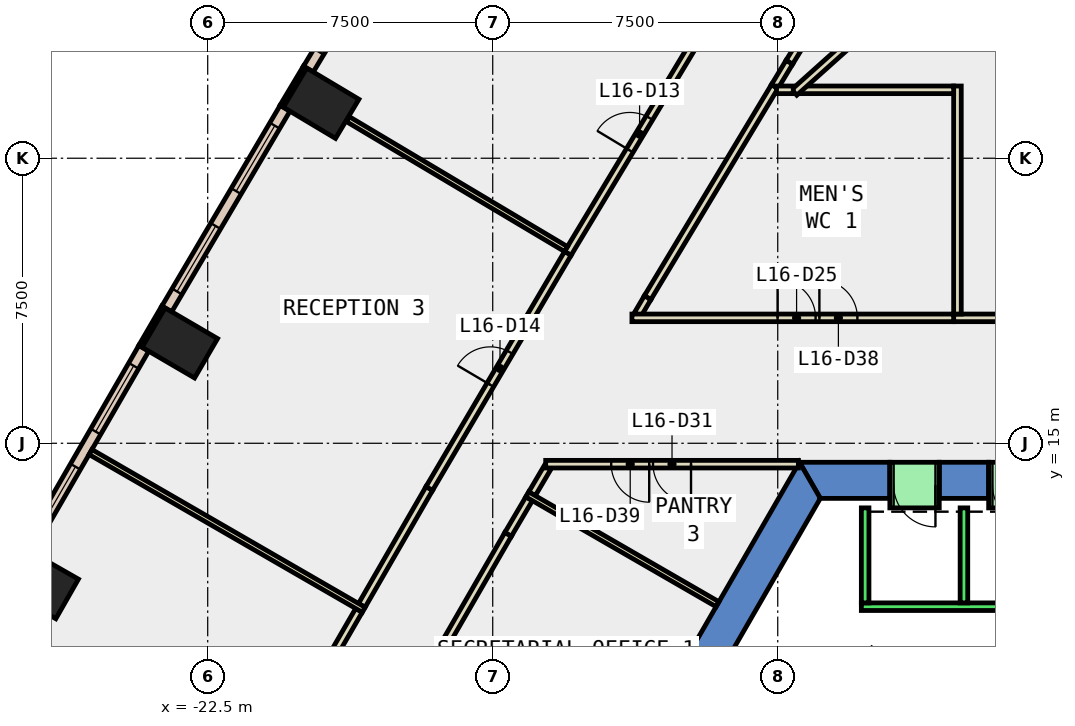
"""IFC4 building model, lengths in metres.
Left out: names, types, materials, properties, quantities, classifications, styles, units other than length and angle.
Written with IfcOpenShell. Run it as: python <this file> out.ifc"""

import sys

from ifc_helpers import new_model, si_unit, direction, frame, frame_2d, origin, origin_2d, place, context, subcontext, project, spatial, polyline, rectangle, outline, extrude, element, fill, save


model = new_model("IFC4")
c1 = context("Model", 3, precision=1e-05, world=origin(), true_north=direction((0.0, 1.0)))
c2 = subcontext(c1, "Body", "Model", "MODEL_VIEW")
j1 = project(units=[si_unit("LENGTHUNIT", "METRE"), si_unit("PLANEANGLEUNIT", "RADIAN")], contexts=[c1])
p1 = place(None, origin())
s1 = spatial("IfcSite", under=j1, at=p1, CompositionType="ELEMENT")
p2 = place(p1, origin())
s2 = spatial("IfcBuilding", under=s1, at=p2, CompositionType="ELEMENT")
p3 = place(p2, frame((0.0, 0.0, 77.0)))
s3 = spatial("IfcBuildingStorey", under=s2, at=p3, CompositionType="ELEMENT", Elevation=77.0)
for number, where, z_axis, x_axis in (
    (1, (-19.516, 23.947, -0.4), (0.0, 0.0, 1.0), (0.513, 0.858, 0.0)),
    (2, (-23.234, 17.64, -0.4), (0.0, 0.0, 1.0), (0.504, 0.864, 0.0)),
    (3, (-26.894, 11.301, -0.4), (0.0, 0.0, 1.0), (0.496, 0.869, 0.0)),
):
    element("IfcColumn", number, at=place(p3, frame(where, z_axis=z_axis, x_axis=x_axis)), inside=s3, PredefinedType="COLUMN", context=c2, shape_type="SweptSolid", body=[
        extrude(rectangle(XDim=1.2, YDim=1.6, at=origin_2d()), origin(), (0.0, 0.0, 1.0), 4.0),
    ])
p4 = place(p3, frame((0.0, 0.0, -0.4)))
e4 = element("IfcWall", 4, at=p4, inside=s3, PredefinedType="SHEAR", context=c2, shape_type="SweptSolid", body=[
    extrude(outline(polyline([(-3.25, 14.5), (-3.25, 13.55), (-1.95, 13.55), (-1.95, 14.5), (-3.25, 14.5)])), origin(), (0.0, 0.0, 1.0), 4.0),
])
p5 = place(p3, frame((0.0, 0.0, -0.4)))
e5 = element("IfcWall", 5, at=p5, inside=s3, PredefinedType="SHEAR", context=c2, shape_type="SweptSolid", body=[
    extrude(outline(polyline([(-4.55, 13.55), (-4.55, 14.5), (-6.928, 14.5), (-6.38, 13.55), (-4.55, 13.55)])), origin(), (0.0, 0.0, 1.0), 4.0),
])
p6 = place(p3, frame((0.0, 0.0, -0.4)))
e6 = element("IfcWall", 6, at=p6, inside=s3, PredefinedType="SHEAR", context=c2, shape_type="SweptSolid", body=[
    extrude(outline(polyline([(-12.267, 5.252), (-11.444, 4.777), (-6.38, 13.55), (-6.928, 14.5), (-12.267, 5.252)])), origin(), (0.0, 0.0, 1.0), 4.0),
])
p7 = place(p3, frame((-19.938, 24.898, 0.0), z_axis=(0.0, 0.0, 1.0), x_axis=(-0.513238760752, -0.858245870635, 0.0)))
e7 = element("IfcWall", 7, at=p7, inside=s3, PredefinedType="STANDARD", context=c2, shape_type="SweptSolid", body=[
    extrude(rectangle(XDim=1.2, YDim=0.1, at=frame_2d((0.6, 0.0))), origin(), (0.0, 0.0, 1.0), 3.6),
])
p8 = place(p3, frame((-23.665, 18.587, 0.0), z_axis=(0.0, 0.0, 1.0), x_axis=(-0.504313844903, -0.863520437418, 0.0)))
e8 = element("IfcWall", 8, at=p8, inside=s3, PredefinedType="STANDARD", context=c2, shape_type="SweptSolid", body=[
    extrude(rectangle(XDim=1.2, YDim=0.1, at=frame_2d((0.6, 0.0))), origin(), (0.0, 0.0, 1.0), 3.6),
])
p9 = place(p3, frame((-16.69, 30.097, 0.0), z_axis=(0.0, 0.0, 1.0), x_axis=(-0.515690089348, -0.856775193238, 0.0)))
e9 = element("IfcWall", 9, at=p9, inside=s3, PredefinedType="STANDARD", context=c2, shape_type="SweptSolid", body=[
    extrude(rectangle(XDim=6.13, YDim=0.3, at=frame_2d((3.065, 0.0))), origin(), (0.0, 0.0, 1.0), 3.6),
])
p10 = place(p9, frame((0.532, 0.0, 0.9)))
e10 = element("IfcOpeningElement", 10, at=p10, cuts=e9, PredefinedType="OPENING", context=c2, shape_type="SweptSolid", body=[
    extrude(rectangle(XDim=2.0, YDim=2.6, at=frame_2d((1.0, 1.3))), frame((0.0, 0.16, 0.0), z_axis=(0.0, -1.0, 0.0), x_axis=(1.0, 0.0, 0.0)), (0.0, 0.0, 1.0), 0.32),
])
p11 = place(p9, frame((3.597, 0.0, 0.9)))
e11 = element("IfcOpeningElement", 11, at=p11, cuts=e9, PredefinedType="OPENING", context=c2, shape_type="SweptSolid", body=[
    extrude(rectangle(XDim=2.0, YDim=2.6, at=frame_2d((1.0, 1.3))), frame((0.0, 0.16, 0.0), z_axis=(0.0, -1.0, 0.0), x_axis=(1.0, 0.0, 0.0)), (0.0, 0.0, 1.0), 0.32),
])
p12 = place(p3, frame((-20.464, 23.816, 0.0), z_axis=(0.0, 0.0, 1.0), x_axis=(-0.507716058644, -0.861524465001, 0.0)))
e12 = element("IfcWall", 12, at=p12, inside=s3, PredefinedType="STANDARD", context=c2, shape_type="SweptSolid", body=[
    extrude(rectangle(XDim=6.131, YDim=0.3, at=frame_2d((3.065, 0.0))), origin(), (0.0, 0.0, 1.0), 3.6),
])
p13 = place(p12, frame((0.533, 0.0, 0.9)))
e13 = element("IfcOpeningElement", 13, at=p13, cuts=e12, PredefinedType="OPENING", context=c2, shape_type="SweptSolid", body=[
    extrude(rectangle(XDim=2.0, YDim=2.6, at=frame_2d((1.0, 1.3))), frame((0.0, 0.16, 0.0), z_axis=(0.0, -1.0, 0.0), x_axis=(1.0, 0.0, 0.0)), (0.0, 0.0, 1.0), 0.32),
])
p14 = place(p12, frame((3.598, 0.0, 0.9)))
e14 = element("IfcOpeningElement", 14, at=p14, cuts=e12, PredefinedType="OPENING", context=c2, shape_type="SweptSolid", body=[
    extrude(rectangle(XDim=2.0, YDim=2.6, at=frame_2d((1.0, 1.3))), frame((0.0, 0.16, 0.0), z_axis=(0.0, -1.0, 0.0), x_axis=(1.0, 0.0, 0.0)), (0.0, 0.0, 1.0), 0.32),
])
p15 = place(p3, frame((-24.181, 17.5, 0.0), z_axis=(0.0, 0.0, 1.0), x_axis=(-0.499998239139, -0.866026420416, 0.0)))
e15 = element("IfcWall", 15, at=p15, inside=s3, PredefinedType="STANDARD", context=c2, shape_type="SweptSolid", body=[
    extrude(rectangle(XDim=6.13, YDim=0.3, at=frame_2d((3.065, 0.0))), origin(), (0.0, 0.0, 1.0), 3.6),
])
p16 = place(p15, frame((0.533, 0.0, 0.9)))
e16 = element("IfcOpeningElement", 16, at=p16, cuts=e15, PredefinedType="OPENING", context=c2, shape_type="SweptSolid", body=[
    extrude(rectangle(XDim=2.0, YDim=2.6, at=frame_2d((1.0, 1.3))), frame((0.0, 0.16, 0.0), z_axis=(0.0, -1.0, 0.0), x_axis=(1.0, 0.0, 0.0)), (0.0, 0.0, 1.0), 0.32),
])
p17 = place(p15, frame((3.598, 0.0, 0.9)))
e17 = element("IfcOpeningElement", 17, at=p17, cuts=e15, PredefinedType="OPENING", context=c2, shape_type="SweptSolid", body=[
    extrude(rectangle(XDim=2.0, YDim=2.6, at=frame_2d((1.0, 1.3))), frame((0.0, 0.16, 0.0), z_axis=(0.0, -1.0, 0.0), x_axis=(1.0, 0.0, 0.0)), (0.0, 0.0, 1.0), 0.32),
])
p18 = place(p3, frame((-14.042, 13.541, 0.0), z_axis=(0.0, 0.0, 1.0), x_axis=(-0.507733830316, -0.861513991501, 0.0)))
e18 = element("IfcWall", 18, at=p18, inside=s3, PredefinedType="PARTITIONING", context=c2, shape_type="SweptSolid", body=[
    extrude(rectangle(XDim=1.091, YDim=0.2, at=frame_2d((0.545, 0.0))), origin(), (0.0, 0.0, 1.0), 3.6),
])
p19 = place(p3, frame((-14.596, 12.601, 0.0), z_axis=(0.0, 0.0, 1.0), x_axis=(-0.500017431331, -0.866015339567, 0.0)))
e19 = element("IfcWall", 19, at=p19, inside=s3, PredefinedType="PARTITIONING", context=c2, shape_type="SweptSolid", body=[
    extrude(rectangle(XDim=4.8, YDim=0.2, at=frame_2d((2.4, 0.0))), origin(), (0.0, 0.0, 1.0), 3.6),
])
p20 = place(p3, frame((-13.557, 14.364, 0.0), z_axis=(0.0, 0.0, 1.0), x_axis=(-0.507840899418, -0.861450881292, 0.0)))
e20 = element("IfcWall", 20, at=p20, inside=s3, PredefinedType="PARTITIONING", context=c2, shape_type="SweptSolid", body=[
    extrude(rectangle(XDim=0.806, YDim=0.2, at=frame_2d((0.403, 0.0))), origin(), (0.0, 0.0, 1.0), 3.6),
])
p21 = place(p3, frame((-7.58, 24.386, 0.0), z_axis=(0.0, 0.0, 1.0), x_axis=(-0.51574664882, -0.85674114774, 0.0)))
e21 = element("IfcWall", 21, at=p21, inside=s3, PredefinedType="PARTITIONING", context=c2, shape_type="SweptSolid", body=[
    extrude(rectangle(XDim=6.484, YDim=0.2, at=frame_2d((3.242, 0.0))), origin(), (0.0, 0.0, 1.0), 3.6),
])
p22 = place(p3, frame((-10.924, 18.831, 0.0), z_axis=(0.0, 0.0, 1.0), x_axis=(-0.507247363226, -0.861800506208, 0.0)))
e22 = element("IfcWall", 22, at=p22, inside=s3, PredefinedType="PARTITIONING", context=c2, shape_type="SweptSolid", body=[
    extrude(rectangle(XDim=0.516, YDim=0.2, at=frame_2d((0.258, 0.0))), origin(), (0.0, 0.0, 1.0), 3.6),
])
p23 = place(p3, frame((-3.411, 31.185, 0.0), z_axis=(0.0, 0.0, 1.0), x_axis=(-0.523464329994, -0.852047589765, 0.0)))
e23 = element("IfcWall", 23, at=p23, inside=s3, PredefinedType="PARTITIONING", context=c2, shape_type="SweptSolid", body=[
    extrude(rectangle(XDim=7.231, YDim=0.2, at=frame_2d((3.615, 0.0))), origin(), (0.0, 0.0, 1.0), 3.6),
])
p24 = place(p23, frame((3.115, 0.0, 0.0)))
e24 = element("IfcOpeningElement", 24, at=p24, cuts=e23, PredefinedType="OPENING", context=c2, shape_type="SweptSolid", body=[
    extrude(rectangle(XDim=1.0, YDim=2.1, at=frame_2d((0.5, 1.05))), frame((0.0, 0.11, 0.0), z_axis=(0.0, -1.0, 0.0), x_axis=(1.0, 0.0, 0.0)), (0.0, 0.0, 1.0), 0.22),
])
p25 = place(p3, frame((-7.196, 25.024, 0.0), z_axis=(0.0, 0.0, 1.0), x_axis=(-0.515748848873, -0.856739823334, 0.0)))
e25 = element("IfcWall", 25, at=p25, inside=s3, PredefinedType="PARTITIONING", context=c2, shape_type="SweptSolid", body=[
    extrude(rectangle(XDim=0.745, YDim=0.2, at=frame_2d((0.372, 0.0))), origin(), (0.0, 0.0, 1.0), 3.6),
])
p26 = place(p3, frame((-13.025, 19.995, 0.0), z_axis=(0.0, 0.0, 1.0), x_axis=(0.515828195336, 0.856692052546, 0.0)))
e26 = element("IfcWall", 26, at=p26, inside=s3, PredefinedType="PARTITIONING", context=c2, shape_type="SweptSolid", body=[
    extrude(rectangle(XDim=7.326, YDim=0.2, at=frame_2d((3.663, 0.0))), origin(), (0.0, 0.0, 1.0), 3.6),
])
p27 = place(p26, frame((3.163, 0.0, 0.0)))
e27 = element("IfcOpeningElement", 27, at=p27, cuts=e26, PredefinedType="OPENING", context=c2, shape_type="SweptSolid", body=[
    extrude(rectangle(XDim=1.0, YDim=2.1, at=frame_2d((0.5, 1.05))), frame((0.0, 0.11, 0.0), z_axis=(0.0, -1.0, 0.0), x_axis=(1.0, 0.0, 0.0)), (0.0, 0.0, 1.0), 0.22),
])
p28 = place(p3, frame((-18.445, 10.734, 0.0), z_axis=(0.0, 0.0, 1.0), x_axis=(0.499900903336, 0.866082609711, 0.0)))
e28 = element("IfcWall", 28, at=p28, inside=s3, PredefinedType="PARTITIONING", context=c2, shape_type="SweptSolid", body=[
    extrude(rectangle(XDim=3.553, YDim=0.2, at=frame_2d((1.776, 0.0))), origin(), (0.0, 0.0, 1.0), 3.6),
])
p29 = place(p3, frame((-16.669, 13.811, 0.0), z_axis=(0.0, 0.0, 1.0), x_axis=(0.507777955495, 0.861487984776, 0.0)))
e29 = element("IfcWall", 29, at=p29, inside=s3, PredefinedType="PARTITIONING", context=c2, shape_type="SweptSolid", body=[
    extrude(rectangle(XDim=7.178, YDim=0.2, at=frame_2d((3.589, 0.0))), origin(), (0.0, 0.0, 1.0), 3.6),
])
p30 = place(p29, frame((3.164, 0.0, 0.0)))
e30 = element("IfcOpeningElement", 30, at=p30, cuts=e29, PredefinedType="OPENING", context=c2, shape_type="SweptSolid", body=[
    extrude(rectangle(XDim=1.0, YDim=2.1, at=frame_2d((0.5, 1.05))), frame((0.0, 0.11, 0.0), z_axis=(0.0, -1.0, 0.0), x_axis=(1.0, 0.0, 0.0)), (0.0, 0.0, 1.0), 0.22),
])
p31 = place(p3, frame((-20.296, 7.53, 0.0), z_axis=(0.0, 0.0, 1.0), x_axis=(0.500236350306, 0.865888903863, 0.0)))
e31 = element("IfcWall", 31, at=p31, inside=s3, PredefinedType="PARTITIONING", context=c2, shape_type="SweptSolid", body=[
    extrude(rectangle(XDim=3.55, YDim=0.2, at=frame_2d((1.775, 0.0))), origin(), (0.0, 0.0, 1.0), 3.6),
])
p32 = place(p3, frame((-14.091, 13.655, 0.0), z_axis=(0.0, 0.0, 1.0), x_axis=(0.866035778077, -0.499982030767, 0.0)))
e32 = element("IfcWall", 32, at=p32, inside=s3, PredefinedType="PARTITIONING", context=c2, shape_type="SweptSolid", body=[
    extrude(rectangle(XDim=5.781, YDim=0.15, at=frame_2d((2.89, 0.0))), origin(), (0.0, 0.0, 1.0), 3.6),
])
p33 = place(p3, frame((-6.957, 14.45, 0.0), z_axis=(0.0, 0.0, 1.0), x_axis=(-1.0, 0.0, 0.0)))
e33 = element("IfcWall", 33, at=p33, inside=s3, PredefinedType="PARTITIONING", context=c2, shape_type="SweptSolid", body=[
    extrude(rectangle(XDim=6.649, YDim=0.2, at=frame_2d((3.324, 0.0))), origin(), (0.0, 0.0, 1.0), 3.6),
])
p34 = place(p33, frame((2.825, 0.0, 0.0)))
e34 = element("IfcOpeningElement", 34, at=p34, cuts=e33, PredefinedType="OPENING", context=c2, shape_type="SweptSolid", body=[
    extrude(rectangle(XDim=1.0, YDim=2.1, at=frame_2d((0.5, 1.05))), frame((0.0, 0.11, 0.0), z_axis=(0.0, -1.0, 0.0), x_axis=(1.0, 0.0, 0.0)), (0.0, 0.0, 1.0), 0.22),
])
p35 = place(p33, frame((3.925, 0.0, 0.0)))
e35 = element("IfcOpeningElement", 35, at=p35, cuts=e33, PredefinedType="OPENING", context=c2, shape_type="SweptSolid", body=[
    extrude(rectangle(XDim=1.0, YDim=2.1, at=frame_2d((0.5, 1.05))), frame((0.0, 0.11, 0.0), z_axis=(0.0, -1.0, 0.0), x_axis=(1.0, 0.0, 0.0)), (0.0, 0.0, 1.0), 0.22),
])
p36 = place(p3, frame((-2.871, 18.3, 0.0), z_axis=(0.0, 0.0, 1.0), x_axis=(1.0, 0.0, 0.0)))
e36 = element("IfcWall", 36, at=p36, inside=s3, PredefinedType="PARTITIONING", context=c2, shape_type="SweptSolid", body=[
    extrude(rectangle(XDim=2.471, YDim=0.2, at=frame_2d((1.236, 0.0))), origin(), (0.0, 0.0, 1.0), 3.6),
])
p37 = place(p3, frame((-11.337, 18.3, 0.0), z_axis=(0.0, 0.0, 1.0), x_axis=(1.0, 0.0, 0.0)))
e37 = element("IfcWall", 37, at=p37, inside=s3, PredefinedType="PARTITIONING", context=c2, shape_type="SweptSolid", body=[
    extrude(rectangle(XDim=8.466, YDim=0.2, at=frame_2d((4.233, 0.0))), origin(), (0.0, 0.0, 1.0), 3.6),
])
p38 = place(p37, frame((3.833, 0.0, 0.0)))
e38 = element("IfcOpeningElement", 38, at=p38, cuts=e37, PredefinedType="OPENING", context=c2, shape_type="SweptSolid", body=[
    extrude(rectangle(XDim=1.0, YDim=2.1, at=frame_2d((0.5, 1.05))), frame((0.0, 0.11, 0.0), z_axis=(0.0, -1.0, 0.0), x_axis=(1.0, 0.0, 0.0)), (0.0, 0.0, 1.0), 0.22),
])
p39 = place(p37, frame((4.933, 0.0, 0.0)))
e39 = element("IfcOpeningElement", 39, at=p39, cuts=e37, PredefinedType="OPENING", context=c2, shape_type="SweptSolid", body=[
    extrude(rectangle(XDim=1.0, YDim=2.1, at=frame_2d((0.5, 1.05))), frame((0.0, 0.11, 0.0), z_axis=(0.0, -1.0, 0.0), x_axis=(1.0, 0.0, 0.0)), (0.0, 0.0, 1.0), 0.22),
])
p40 = place(p3, frame((-2.771, 18.4, 0.0), z_axis=(0.0, 0.0, 1.0), x_axis=(0.0, 1.0, 0.0)))
e40 = element("IfcWall", 40, at=p40, inside=s3, PredefinedType="PARTITIONING", context=c2, shape_type="SweptSolid", body=[
    extrude(rectangle(XDim=6.0, YDim=0.2, at=frame_2d((3.0, 0.0))), origin(), (0.0, 0.0, 1.0), 3.6),
])
p41 = place(p3, frame((-2.871, 24.3, 0.0), z_axis=(0.0, 0.0, 1.0), x_axis=(-1.0, 0.0, 0.0)))
e41 = element("IfcWall", 41, at=p41, inside=s3, PredefinedType="PARTITIONING", context=c2, shape_type="SweptSolid", body=[
    extrude(rectangle(XDim=4.02, YDim=0.2, at=frame_2d((2.01, 0.0))), origin(), (0.0, 0.0, 1.0), 3.6),
])
p42 = place(p3, frame((-7.065, 24.233, 0.0), z_axis=(0.0, 0.0, 1.0), x_axis=(0.745362618546, 0.666659258448, 0.0)))
e42 = element("IfcWall", 42, at=p42, inside=s3, PredefinedType="PARTITIONING", context=c2, shape_type="SweptSolid", body=[
    extrude(rectangle(XDim=9.579, YDim=0.2, at=frame_2d((4.79, 0.0))), origin(), (0.0, 0.0, 1.0), 3.6),
])
p43 = place(p3, frame((-7.532, 24.3, 0.0), z_axis=(0.0, 0.0, 1.0), x_axis=(1.0, 0.0, 0.0)))
e43 = element("IfcWall", 43, at=p43, inside=s3, PredefinedType="PARTITIONING", context=c2, shape_type="SweptSolid", body=[
    extrude(rectangle(XDim=0.441, YDim=0.2, at=frame_2d((0.22, 0.0))), origin(), (0.0, 0.0, 1.0), 3.6),
])
p44 = place(p3, frame((-13.072, 20.11, 0.0), z_axis=(0.0, 0.0, 1.0), x_axis=(-0.859168554094, 0.511692676961, 0.0)))
e44 = element("IfcWall", 44, at=p44, inside=s3, PredefinedType="PARTITIONING", context=c2, shape_type="SweptSolid", body=[
    extrude(rectangle(XDim=6.68, YDim=0.15, at=frame_2d((3.34, 0.0))), origin(), (0.0, 0.0, 1.0), 3.6),
])
p45 = place(p3, frame((-18.396, 10.619, 0.0), z_axis=(0.0, 0.0, 1.0), x_axis=(-0.865966132161, 0.500102647413, 0.0)))
e45 = element("IfcWall", 45, at=p45, inside=s3, PredefinedType="PARTITIONING", context=c2, shape_type="SweptSolid", body=[
    extrude(rectangle(XDim=8.301, YDim=0.15, at=frame_2d((4.15, 0.0))), origin(), (0.0, 0.0, 1.0), 3.6),
])
p46 = place(p3, frame((5.3, 10.7, 0.0), z_axis=(0.0, 0.0, 1.0), x_axis=(-1.0, 0.0, 0.0)))
e46 = element("IfcWall", 46, at=p46, inside=s3, PredefinedType="STANDARD", context=c2, shape_type="SweptSolid", body=[
    extrude(rectangle(XDim=10.6, YDim=0.2, at=frame_2d((5.3, 0.0))), origin(), (0.0, 0.0, 1.0), 3.6),
])
for number, where, z_axis, x_axis in (
    (47, (-2.6, 10.8, 0.0), (0.0, 0.0, 1.0), (0.0, 1.0, 0.0)),
    (48, (-5.2, 10.8, 0.0), (0.0, 0.0, 1.0), (0.0, 1.0, 0.0)),
):
    element("IfcWall", number, at=place(p3, frame(where, z_axis=z_axis, x_axis=x_axis)), inside=s3, PredefinedType="STANDARD", context=c2, shape_type="SweptSolid", body=[
        extrude(rectangle(XDim=2.5, YDim=0.2, at=frame_2d((1.25, 0.0))), origin(), (0.0, 0.0, 1.0), 3.6),
    ])
p47 = place(p3, frame((-0.65, 13.9, 0.0), z_axis=(0.0, 0.0, 1.0), x_axis=(-1.0, 0.0, 0.0)))
e49 = element("IfcWall", 49, at=p47, inside=s3, PredefinedType="STANDARD", context=c2, shape_type="SweptSolid", body=[
    extrude(rectangle(XDim=1.3, YDim=1.2, at=frame_2d((0.65, 0.0))), origin(), (0.0, 0.0, 1.0), 2.4),
])
p48 = place(p47, frame((0.1, 0.0, 0.0)))
e50 = element("IfcOpeningElement", 50, at=p48, cuts=e49, PredefinedType="OPENING", context=c2, shape_type="SweptSolid", body=[
    extrude(rectangle(XDim=1.1, YDim=2.3, at=frame_2d((0.55, 1.15))), frame((0.0, 0.61, 0.0), z_axis=(0.0, -1.0, 0.0), x_axis=(1.0, 0.0, 0.0)), (0.0, 0.0, 1.0), 1.22),
])
p49 = place(p3, frame((-3.25, 13.9, 0.0), z_axis=(0.0, 0.0, 1.0), x_axis=(-1.0, 0.0, 0.0)))
e51 = element("IfcWall", 51, at=p49, inside=s3, PredefinedType="STANDARD", context=c2, shape_type="SweptSolid", body=[
    extrude(rectangle(XDim=1.3, YDim=1.2, at=frame_2d((0.65, 0.0))), origin(), (0.0, 0.0, 1.0), 2.4),
])
p50 = place(p49, frame((0.1, 0.0, 0.0)))
e52 = element("IfcOpeningElement", 52, at=p50, cuts=e51, PredefinedType="OPENING", context=c2, shape_type="SweptSolid", body=[
    extrude(rectangle(XDim=1.1, YDim=2.3, at=frame_2d((0.55, 1.15))), frame((0.0, 0.61, 0.0), z_axis=(0.0, -1.0, 0.0), x_axis=(1.0, 0.0, 0.0)), (0.0, 0.0, 1.0), 1.22),
])
p51 = place(p11, origin())
e53 = element("IfcWindow", 53, at=p51, inside=s3, PartitioningType="SINGLE_PANEL", PredefinedType="WINDOW", context=c2, shape_type="SweptSolid", body=[
    extrude(rectangle(XDim=2.0, YDim=2.6, at=frame_2d((1.0, 1.3))), frame((0.0, 0.03, 0.0), z_axis=(0.0, -1.0, 0.0), x_axis=(1.0, 0.0, 0.0)), (0.0, 0.0, 1.0), 0.06),
])
fill(e11, e53)
p52 = place(p13, origin())
e54 = element("IfcWindow", 54, at=p52, inside=s3, PartitioningType="SINGLE_PANEL", PredefinedType="WINDOW", context=c2, shape_type="SweptSolid", body=[
    extrude(rectangle(XDim=2.0, YDim=2.6, at=frame_2d((1.0, 1.3))), frame((0.0, 0.03, 0.0), z_axis=(0.0, -1.0, 0.0), x_axis=(1.0, 0.0, 0.0)), (0.0, 0.0, 1.0), 0.06),
])
fill(e13, e54)
p53 = place(p14, origin())
e55 = element("IfcWindow", 55, at=p53, inside=s3, PartitioningType="SINGLE_PANEL", PredefinedType="WINDOW", context=c2, shape_type="SweptSolid", body=[
    extrude(rectangle(XDim=2.0, YDim=2.6, at=frame_2d((1.0, 1.3))), frame((0.0, 0.03, 0.0), z_axis=(0.0, -1.0, 0.0), x_axis=(1.0, 0.0, 0.0)), (0.0, 0.0, 1.0), 0.06),
])
fill(e14, e55)
p54 = place(p16, origin())
e56 = element("IfcWindow", 56, at=p54, inside=s3, PartitioningType="SINGLE_PANEL", PredefinedType="WINDOW", context=c2, shape_type="SweptSolid", body=[
    extrude(rectangle(XDim=2.0, YDim=2.6, at=frame_2d((1.0, 1.3))), frame((0.0, 0.03, 0.0), z_axis=(0.0, -1.0, 0.0), x_axis=(1.0, 0.0, 0.0)), (0.0, 0.0, 1.0), 0.06),
])
fill(e16, e56)
p55 = place(p17, origin())
e57 = element("IfcWindow", 57, at=p55, inside=s3, PartitioningType="SINGLE_PANEL", PredefinedType="WINDOW", context=c2, shape_type="SweptSolid", body=[
    extrude(rectangle(XDim=2.0, YDim=2.6, at=frame_2d((1.0, 1.3))), frame((0.0, 0.03, 0.0), z_axis=(0.0, -1.0, 0.0), x_axis=(1.0, 0.0, 0.0)), (0.0, 0.0, 1.0), 0.06),
])
fill(e17, e57)
p56 = place(p27, origin())
e58 = element("IfcDoor", 58, at=p56, inside=s3, OperationType="SINGLE_SWING_LEFT", PredefinedType="DOOR", context=c2, shape_type="SweptSolid", body=[
    extrude(rectangle(XDim=1.0, YDim=2.1, at=frame_2d((0.5, 1.05))), frame((0.0, 0.025, 0.0), z_axis=(0.0, -1.0, 0.0), x_axis=(1.0, 0.0, 0.0)), (0.0, 0.0, 1.0), 0.05),
])
fill(e27, e58)
p57 = place(p30, origin())
e59 = element("IfcDoor", 59, at=p57, inside=s3, OperationType="SINGLE_SWING_LEFT", PredefinedType="DOOR", context=c2, shape_type="SweptSolid", body=[
    extrude(rectangle(XDim=1.0, YDim=2.1, at=frame_2d((0.5, 1.05))), frame((0.0, 0.025, 0.0), z_axis=(0.0, -1.0, 0.0), x_axis=(1.0, 0.0, 0.0)), (0.0, 0.0, 1.0), 0.05),
])
fill(e30, e59)
p58 = place(p38, origin())
e60 = element("IfcDoor", 60, at=p58, inside=s3, OperationType="SINGLE_SWING_RIGHT", PredefinedType="DOOR", context=c2, shape_type="SweptSolid", body=[
    extrude(rectangle(XDim=1.0, YDim=2.1, at=frame_2d((0.5, 1.05))), frame((0.0, 0.025, 0.0), z_axis=(0.0, -1.0, 0.0), x_axis=(1.0, 0.0, 0.0)), (0.0, 0.0, 1.0), 0.05),
])
fill(e38, e60)
p59 = place(p34, origin())
e61 = element("IfcDoor", 61, at=p59, inside=s3, OperationType="SINGLE_SWING_LEFT", PredefinedType="DOOR", context=c2, shape_type="SweptSolid", body=[
    extrude(rectangle(XDim=1.0, YDim=2.1, at=frame_2d((0.5, 1.05))), frame((0.0, 0.025, 0.0), z_axis=(0.0, -1.0, 0.0), x_axis=(1.0, 0.0, 0.0)), (0.0, 0.0, 1.0), 0.05),
])
fill(e34, e61)
p60 = place(p39, origin())
e62 = element("IfcDoor", 62, at=p60, inside=s3, OperationType="SINGLE_SWING_RIGHT", PredefinedType="DOOR", context=c2, shape_type="SweptSolid", body=[
    extrude(rectangle(XDim=1.0, YDim=2.1, at=frame_2d((0.5, 1.05))), frame((0.0, 0.025, 0.0), z_axis=(0.0, -1.0, 0.0), x_axis=(1.0, 0.0, 0.0)), (0.0, 0.0, 1.0), 0.05),
])
fill(e39, e62)
p61 = place(p35, origin())
e63 = element("IfcDoor", 63, at=p61, inside=s3, OperationType="SINGLE_SWING_RIGHT", PredefinedType="DOOR", context=c2, shape_type="SweptSolid", body=[
    extrude(rectangle(XDim=1.0, YDim=2.1, at=frame_2d((0.5, 1.05))), frame((0.0, 0.025, 0.0), z_axis=(0.0, -1.0, 0.0), x_axis=(1.0, 0.0, 0.0)), (0.0, 0.0, 1.0), 0.05),
])
fill(e35, e63)
p62 = place(p48, origin())
e64 = element("IfcDoor", 64, at=p62, inside=s3, OperationType="SLIDING_TO_LEFT", PredefinedType="DOOR", context=c2, shape_type="SweptSolid", body=[
    extrude(rectangle(XDim=1.1, YDim=2.3, at=frame_2d((0.55, 1.15))), frame((0.0, 0.025, 0.0), z_axis=(0.0, -1.0, 0.0), x_axis=(1.0, 0.0, 0.0)), (0.0, 0.0, 1.0), 0.05),
])
fill(e50, e64)
p63 = place(p50, origin())
e65 = element("IfcDoor", 65, at=p63, inside=s3, OperationType="SLIDING_TO_LEFT", PredefinedType="DOOR", context=c2, shape_type="SweptSolid", body=[
    extrude(rectangle(XDim=1.1, YDim=2.3, at=frame_2d((0.55, 1.15))), frame((0.0, 0.025, 0.0), z_axis=(0.0, -1.0, 0.0), x_axis=(1.0, 0.0, 0.0)), (0.0, 0.0, 1.0), 0.05),
])
fill(e52, e65)
save(model, sys.argv[1])
